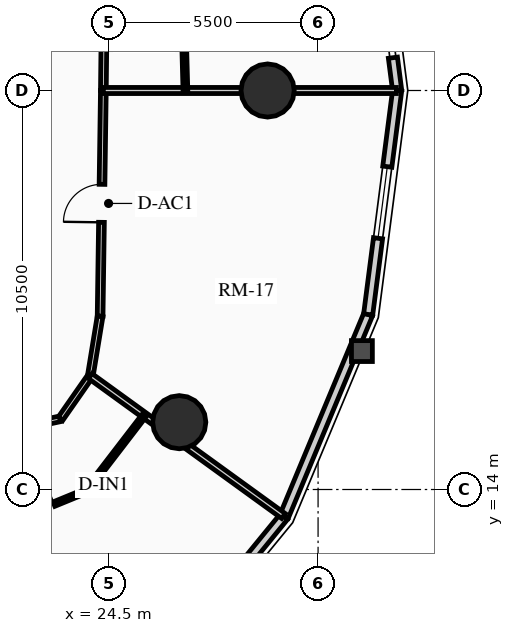
"""IFC4 building model, lengths in metres.
Left out: names, types, materials, properties, quantities, classifications, styles, units other than length and angle.
Written with IfcOpenShell. Run it as: python <this file> out.ifc"""

import sys

from ifc_helpers import new_model, si_unit, direction, frame, frame_2d, origin, origin_2d, place, context, subcontext, project, spatial, rectangle, circle, extrude, source, transform, mapped, element, fill, save


model = new_model("IFC4")
c1 = context("Model", 3, precision=1e-05, world=origin(), true_north=direction((0.0, 1.0)))
c2 = subcontext(c1, "Body", "Model", "MODEL_VIEW")
j1 = project(units=[si_unit("LENGTHUNIT", "METRE"), si_unit("PLANEANGLEUNIT", "RADIAN")], contexts=[c1])
p1 = place(None, origin())
s1 = spatial("IfcSite", under=j1, at=p1, CompositionType="ELEMENT")
p2 = place(p1, origin())
s2 = spatial("IfcBuilding", under=s1, at=p2, CompositionType="ELEMENT")
p3 = place(p2, frame((0.0, 0.0, 90.52)))
s3 = spatial("IfcBuildingStorey", under=s2, at=p3, CompositionType="ELEMENT", Elevation=90.52)
for number, where, z_axis, x_axis in (
    (1, (28.672, 24.5, 0.0), (0.0, 0.0, 1.0), (1.0, 0.0, 0.0)),
    (2, (26.347, 15.771, 0.0), (0.0, 0.0, 1.0), (1.0, 0.0, 0.0)),
):
    element("IfcColumn", number, at=place(p3, frame(where, z_axis=z_axis, x_axis=x_axis)), inside=s3, PredefinedType="USERDEFINED", context=c2, shape_type="SweptSolid", body=[
        extrude(circle(Radius=0.7, at=origin_2d()), origin(), (0.0, 0.0, 1.0), 2.91),
    ])
p4 = place(p3, frame((31.969, 25.363, 0.0), z_axis=(0.0, 0.0, 1.0), x_axis=(0.128523364007, -0.991706481225, 0.0)))
e3 = element("IfcWall", 3, at=p4, inside=s3, PredefinedType="SOLIDWALL", context=c2, shape_type="SweptSolid", body=[
    extrude(rectangle(XDim=0.87, YDim=0.24, at=frame_2d((0.435, 0.0))), origin(), (0.0, 0.0, 1.0), 2.655),
])
p5 = place(p3, frame((29.105, 13.291, 0.0), z_axis=(0.0, 0.0, 1.0), x_axis=(-0.632700781152, -0.77439635945, 0.0)))
e4 = element("IfcWall", 4, at=p5, inside=s3, PredefinedType="SOLIDWALL", context=c2, shape_type="SweptSolid", body=[
    extrude(rectangle(XDim=5.448, YDim=0.24, at=frame_2d((2.724, 0.0))), origin(), (0.0, 0.0, 1.0), 2.179),
])
m1 = source(origin(), c2, "Body", "SweptSolid", [
    extrude(rectangle(XDim=2.2, YDim=1.35, at=frame_2d((1.1, 0.675))), frame((0.0, 0.13, 0.0), z_axis=(0.0, -1.0, 0.0), x_axis=(1.0, 0.0, 0.0)), (0.0, 0.0, 1.0), 0.26),
])
p6 = place(p5, frame((1.624, 0.0, 0.65)))
e5 = element("IfcOpeningElement", 5, at=p6, cuts=e4, PredefinedType="OPENING", context=c2, shape_type="MappedRepresentation", body=[
    mapped(m1, transform((0.0, 0.0, 0.0), x_axis=(1.0, 0.0, 0.0), y_axis=(0.0, 1.0, 0.0), z_axis=(0.0, 0.0, 1.0), scale=1.0)),
])
p7 = place(p3, frame((31.318, 18.607, 0.0), z_axis=(0.0, 0.0, 1.0), x_axis=(-0.384344417632, -0.923189779317, 0.0)))
e6 = element("IfcWall", 6, at=p7, inside=s3, PredefinedType="SOLIDWALL", context=c2, shape_type="SweptSolid", body=[
    extrude(rectangle(XDim=5.758, YDim=0.24, at=frame_2d((2.879, 0.0))), origin(), (0.0, 0.0, 1.0), 2.179),
])
p8 = place(p3, frame((32.081, 24.5, 0.0), z_axis=(0.0, 0.0, 1.0), x_axis=(-0.128351991996, -0.991728675672, 0.0)))
e7 = element("IfcWall", 7, at=p8, inside=s3, PredefinedType="SOLIDWALL", context=c2, shape_type="SweptSolid", body=[
    extrude(rectangle(XDim=5.942, YDim=0.24, at=frame_2d((2.971, 0.0))), origin(), (0.0, 0.0, 1.0), 2.179),
])
m2 = source(origin(), c2, "Body", "SweptSolid", [
    extrude(rectangle(XDim=1.9, YDim=1.35, at=frame_2d((0.95, 0.675))), frame((0.0, 0.13, 0.0), z_axis=(0.0, -1.0, 0.0), x_axis=(1.0, 0.0, 0.0)), (0.0, 0.0, 1.0), 0.26),
])
p9 = place(p8, frame((2.021, 0.0, 0.65)))
e8 = element("IfcOpeningElement", 8, at=p9, cuts=e7, PredefinedType="OPENING", context=c2, shape_type="MappedRepresentation", body=[
    mapped(m2, transform((0.0, 0.0, 0.0), x_axis=(1.0, 0.0, 0.0), y_axis=(0.0, 1.0, 0.0), z_axis=(0.0, 0.0, 1.0), scale=1.0)),
])
p10 = place(p3, frame((24.35, 24.5, 0.0), z_axis=(0.0, 0.0, 1.0), x_axis=(0.011582078845, 0.999932925475, 0.0)))
e9 = element("IfcWall", 9, at=p10, inside=s3, PredefinedType="PARTITIONING", context=c2, shape_type="SweptSolid", body=[
    extrude(rectangle(XDim=6.05, YDim=0.15, at=frame_2d((3.025, 0.0))), origin(), (0.0, 0.0, 1.0), 2.225),
])
p11 = place(p3, frame((21.388, 15.468, 0.0), z_axis=(0.0, 0.0, 1.0), x_axis=(0.977672748596, 0.210133283069, 0.0)))
e10 = element("IfcWall", 10, at=p11, inside=s3, PredefinedType="PARTITIONING", context=c2, shape_type="SweptSolid", body=[
    extrude(rectangle(XDim=1.876, YDim=0.15, at=frame_2d((0.938, 0.0))), origin(), (0.0, 0.0, 1.0), 2.225),
])
m3 = source(origin(), c2, "Body", "SweptSolid", [
    extrude(rectangle(XDim=1.05, YDim=2.015, at=frame_2d((0.525, 1.007))), frame((0.0, 0.085, 0.0), z_axis=(0.0, -1.0, 0.0), x_axis=(1.0, 0.0, 0.0)), (0.0, 0.0, 1.0), 0.17),
])
p12 = place(p11, frame((0.413, 0.0, 0.0)))
e11 = element("IfcOpeningElement", 11, at=p12, cuts=e10, PredefinedType="OPENING", context=c2, shape_type="MappedRepresentation", body=[
    mapped(m3, transform((0.0, 0.0, 0.0), x_axis=(1.0, 0.0, 0.0), y_axis=(0.0, 1.0, 0.0), z_axis=(0.0, 0.0, 1.0), scale=1.0)),
])
p13 = place(p3, frame((23.222, 15.862, 0.0), z_axis=(0.0, 0.0, 1.0), x_axis=(0.571941738195, 0.820294244836, 0.0)))
e12 = element("IfcWall", 12, at=p13, inside=s3, PredefinedType="PARTITIONING", context=c2, shape_type="SweptSolid", body=[
    extrude(rectangle(XDim=1.369, YDim=0.15, at=frame_2d((0.685, 0.0))), origin(), (0.0, 0.0, 1.0), 2.225),
])
p14 = place(p3, frame((24.006, 16.985, 0.0), z_axis=(0.0, 0.0, 1.0), x_axis=(0.162043475877, 0.986783619608, 0.0)))
e13 = element("IfcWall", 13, at=p14, inside=s3, PredefinedType="PARTITIONING", context=c2, shape_type="SweptSolid", body=[
    extrude(rectangle(XDim=1.597, YDim=0.15, at=frame_2d((0.798, 0.0))), origin(), (0.0, 0.0, 1.0), 2.225),
])
p15 = place(p3, frame((24.264, 18.561, 0.0), z_axis=(0.0, 0.0, 1.0), x_axis=(0.014427504204, 0.999895918145, 0.0)))
e14 = element("IfcWall", 14, at=p15, inside=s3, PredefinedType="PARTITIONING", context=c2, shape_type="SweptSolid", body=[
    extrude(rectangle(XDim=5.94, YDim=0.15, at=frame_2d((2.97, 0.0))), origin(), (0.0, 0.0, 1.0), 2.655),
])
m4 = source(origin(), c2, "Body", "SweptSolid", [
    extrude(rectangle(XDim=1.0, YDim=2.015, at=frame_2d((0.5, 1.007))), frame((0.0, 0.085, 0.0), z_axis=(0.0, -1.0, 0.0), x_axis=(1.0, 0.0, 0.0)), (0.0, 0.0, 1.0), 0.17),
])
p16 = place(p15, frame((2.47, 0.0, 0.0)))
e15 = element("IfcOpeningElement", 15, at=p16, cuts=e14, PredefinedType="OPENING", context=c2, shape_type="MappedRepresentation", body=[
    mapped(m4, transform((0.0, 0.0, 0.0), x_axis=(1.0, 0.0, 0.0), y_axis=(0.0, 1.0, 0.0), z_axis=(0.0, 0.0, 1.0), scale=1.0)),
])
p17 = place(p3, frame((24.35, 24.5, 0.0), z_axis=(0.0, 0.0, 1.0), x_axis=(1.0, 0.0, 0.0)))
e16 = element("IfcWall", 16, at=p17, inside=s3, PredefinedType="PARTITIONING", context=c2, shape_type="SweptSolid", body=[
    extrude(rectangle(XDim=7.711, YDim=0.16, at=frame_2d((3.855, 0.0))), origin(), (0.0, 0.0, 1.0), 2.179),
])
p18 = place(p3, frame((24.006, 16.985, 0.0), z_axis=(0.0, 0.0, 1.0), x_axis=(0.809849730791, -0.586637378231, 0.0)))
e17 = element("IfcWall", 17, at=p18, inside=s3, PredefinedType="PARTITIONING", context=c2, shape_type="SweptSolid", body=[
    extrude(rectangle(XDim=6.277, YDim=0.16, at=frame_2d((3.139, 0.0))), origin(), (0.0, 0.0, 1.0), 2.179),
])
p19 = place(p3, frame((26.509, 24.5, 0.0), z_axis=(0.0, 0.0, 1.0), x_axis=(-0.027112670792, 0.99963238397, 0.0)))
e18 = element("IfcWall", 18, at=p19, inside=s3, PredefinedType="PARTITIONING", context=c2, shape_type="SweptSolid", body=[
    extrude(rectangle(XDim=6.006, YDim=0.125, at=frame_2d((3.003, 0.0))), origin(), (0.0, 0.0, 1.0), 2.225),
])
p20 = place(p3, frame((21.366, 12.924, 0.0), z_axis=(0.0, 0.0, 1.0), x_axis=(0.924996898971, 0.379974652962, 0.0)))
e19 = element("IfcWall", 19, at=p20, inside=s3, PredefinedType="PARTITIONING", context=c2, shape_type="SweptSolid", body=[
    extrude(rectangle(XDim=2.741, YDim=0.125, at=frame_2d((1.371, 0.0))), origin(), (0.0, 0.0, 1.0), 2.225),
])
m5 = source(origin(), c2, "Body", "SweptSolid", [
    extrude(rectangle(XDim=0.9, YDim=2.005, at=frame_2d((0.45, 1.002))), frame((0.0, 0.073, 0.0), z_axis=(0.0, -1.0, 0.0), x_axis=(1.0, 0.0, 0.0)), (0.0, 0.0, 1.0), 0.145),
])
p21 = place(p20, frame((0.92, 0.0, 0.0)))
e20 = element("IfcOpeningElement", 20, at=p21, cuts=e19, PredefinedType="OPENING", context=c2, shape_type="MappedRepresentation", body=[
    mapped(m5, transform((0.0, 0.0, 0.0), x_axis=(1.0, 0.0, 0.0), y_axis=(0.0, 1.0, 0.0), z_axis=(0.0, 0.0, 1.0), scale=1.0)),
])
p22 = place(p3, frame((23.901, 13.965, 0.0), z_axis=(0.0, 0.0, 1.0), x_axis=(0.609164923344, 0.793043565113, 0.0)))
e21 = element("IfcWall", 21, at=p22, inside=s3, PredefinedType="PARTITIONING", context=c2, shape_type="SweptSolid", body=[
    extrude(rectangle(XDim=2.508, YDim=0.125, at=frame_2d((1.254, 0.0))), origin(), (0.0, 0.0, 1.0), 2.655),
])
m6 = source(origin(), c2, "Body", "SweptSolid", [
    extrude(rectangle(XDim=1.9, YDim=1.35, at=frame_2d((0.95, 0.675))), frame((0.0, 0.03, 0.0), z_axis=(0.0, -1.0, 0.0), x_axis=(1.0, 0.0, 0.0)), (0.0, 0.0, 1.0), 0.06),
])
p23 = place(p9, origin())
e22 = element("IfcWindow", 22, at=p23, inside=s3, PartitioningType="DOUBLE_PANEL_VERTICAL", PredefinedType="WINDOW", context=c2, shape_type="MappedRepresentation", body=[
    mapped(m6, transform((0.0, 0.0, 0.0), x_axis=(1.0, 0.0, 0.0), y_axis=(0.0, 1.0, 0.0), z_axis=(0.0, 0.0, 1.0), scale=1.0)),
])
fill(e8, e22)
m7 = source(origin(), c2, "Body", "SweptSolid", [
    extrude(rectangle(XDim=0.9, YDim=2.005, at=frame_2d((0.45, 1.002))), frame((0.0, 0.025, 0.0), z_axis=(0.0, -1.0, 0.0), x_axis=(1.0, 0.0, 0.0)), (0.0, 0.0, 1.0), 0.05),
])
p24 = place(p21, origin())
e23 = element("IfcDoor", 23, at=p24, inside=s3, OperationType="SINGLE_SWING_RIGHT", PredefinedType="DOOR", context=c2, shape_type="MappedRepresentation", body=[
    mapped(m7, transform((0.0, 0.0, 0.0), x_axis=(1.0, 0.0, 0.0), y_axis=(0.0, 1.0, 0.0), z_axis=(0.0, 0.0, 1.0), scale=1.0)),
])
fill(e20, e23)
m8 = source(origin(), c2, "Body", "SweptSolid", [
    extrude(rectangle(XDim=1.0, YDim=2.015, at=frame_2d((0.5, 1.007))), frame((0.0, 0.025, 0.0), z_axis=(0.0, -1.0, 0.0), x_axis=(1.0, 0.0, 0.0)), (0.0, 0.0, 1.0), 0.05),
])
p25 = place(p16, origin())
e24 = element("IfcDoor", 24, at=p25, inside=s3, OperationType="SINGLE_SWING_LEFT", PredefinedType="DOOR", context=c2, shape_type="MappedRepresentation", body=[
    mapped(m8, transform((0.0, 0.0, 0.0), x_axis=(1.0, 0.0, 0.0), y_axis=(0.0, 1.0, 0.0), z_axis=(0.0, 0.0, 1.0), scale=1.0)),
])
fill(e15, e24)
save(model, sys.argv[1])
